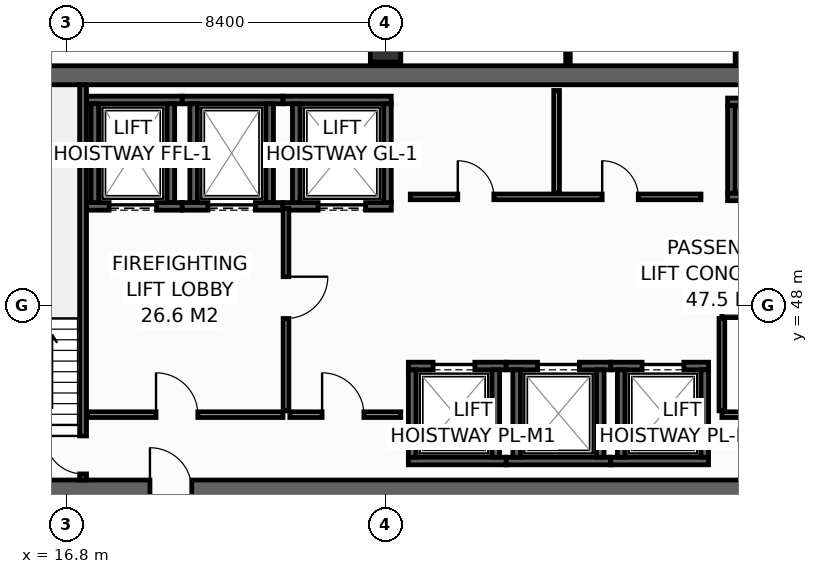
"""IFC4 building model, lengths in metres.
Left out: names, types, materials, properties, quantities, classifications, styles, units other than length and angle.
Written with IfcOpenShell. Run it as: python <this file> out.ifc"""

import sys

from ifc_helpers import new_model, si_unit, direction, frame, frame_2d, origin, origin_2d, place, context, subcontext, project, spatial, rectangle, hollow_rectangle, extrude, element, fill, save


model = new_model("IFC4")
c1 = context("Model", 3, precision=1e-05, world=origin(), true_north=direction((0.0, 1.0)))
c2 = subcontext(c1, "Body", "Model", "MODEL_VIEW")
j1 = project(units=[si_unit("LENGTHUNIT", "METRE"), si_unit("PLANEANGLEUNIT", "RADIAN")], contexts=[c1])
p1 = place(None, origin())
s1 = spatial("IfcSite", under=j1, at=p1, CompositionType="ELEMENT")
p2 = place(p1, origin())
s2 = spatial("IfcBuilding", under=s1, at=p2, CompositionType="ELEMENT")
p3 = place(p2, frame((0.0, 0.0, 209.4)))
s3 = spatial("IfcBuildingStorey", under=s2, at=p3, CompositionType="ELEMENT", Elevation=209.4)
p4 = place(p3, frame((13.6, 43.15, 0.0), z_axis=(0.0, 0.0, 1.0), x_axis=(1.0, 0.0, 0.0)))
e1 = element("IfcWall", 1, at=p4, inside=s3, PredefinedType="SHEAR", context=c2, shape_type="SweptSolid", body=[
    extrude(rectangle(XDim=32.7, YDim=0.5, at=frame_2d((16.35, 0.0))), origin(), (0.0, 0.0, 1.0), 3.55),
])
p5 = place(p4, frame((5.4, 0.0, 0.0)))
e2 = element("IfcOpeningElement", 2, at=p5, cuts=e1, PredefinedType="OPENING", context=c2, shape_type="SweptSolid", body=[
    extrude(rectangle(XDim=1.1, YDim=2.15, at=frame_2d((0.55, 1.075))), frame((0.0, 0.26, 0.0), z_axis=(0.0, -1.0, 0.0), x_axis=(1.0, 0.0, 0.0)), (0.0, 0.0, 1.0), 0.52),
])
p6 = place(p4, frame((25.6, 0.0, 0.0)))
e3 = element("IfcOpeningElement", 3, at=p6, cuts=e1, PredefinedType="OPENING", context=c2, shape_type="SweptSolid", body=[
    extrude(rectangle(XDim=1.1, YDim=2.15, at=frame_2d((0.55, 1.075))), frame((0.0, 0.26, 0.0), z_axis=(0.0, -1.0, 0.0), x_axis=(1.0, 0.0, 0.0)), (0.0, 0.0, 1.0), 0.52),
])
p7 = place(p3, frame((13.6, 54.05, 0.0), z_axis=(0.0, 0.0, 1.0), x_axis=(1.0, 0.0, 0.0)))
e4 = element("IfcWall", 4, at=p7, inside=s3, PredefinedType="SHEAR", context=c2, shape_type="SweptSolid", body=[
    extrude(rectangle(XDim=32.7, YDim=0.5, at=frame_2d((16.35, 0.0))), origin(), (0.0, 0.0, 1.0), 3.55),
])
for number, where, z_axis, x_axis in (
    (5, (25.2, 54.8, 0.0), (0.0, 0.0, 1.0), (1.0, 0.0, 0.0)),
    (6, (34.8, 54.8, 0.0), (0.0, 0.0, 1.0), (1.0, 0.0, 0.0)),
):
    element("IfcColumn", number, at=place(p3, frame(where, z_axis=z_axis, x_axis=x_axis)), inside=s3, PredefinedType="COLUMN", context=c2, shape_type="SweptSolid", body=[
        extrude(hollow_rectangle(XDim=0.8, YDim=0.8, WallThickness=0.036, at=origin_2d()), origin(), (0.0, 0.0, 1.0), 3.8),
    ])
p8 = place(p3, frame((17.33, 50.6, 0.0), z_axis=(0.0, 0.0, 1.0), x_axis=(1.0, 0.0, 0.0)))
e7 = element("IfcWall", 7, at=p8, inside=s3, PredefinedType="SHEAR", context=c2, shape_type="SweptSolid", body=[
    extrude(rectangle(XDim=2.52, YDim=0.2, at=frame_2d((1.26, 0.0))), origin(), (0.0, 0.0, 1.0), 3.55),
])
p9 = place(p8, frame((0.595, 0.0, 0.0)))
e8 = element("IfcOpeningElement", 8, at=p9, cuts=e7, PredefinedType="OPENING", context=c2, shape_type="SweptSolid", body=[
    extrude(rectangle(XDim=1.25, YDim=2.3, at=frame_2d((0.625, 1.15))), frame((0.0, 0.11, 0.0), z_axis=(0.0, -1.0, 0.0), x_axis=(1.0, 0.0, 0.0)), (0.0, 0.0, 1.0), 0.22),
])
p10 = place(p3, frame((17.33, 53.4, 0.0), z_axis=(0.0, 0.0, 1.0), x_axis=(1.0, 0.0, 0.0)))
e9 = element("IfcWall", 9, at=p10, inside=s3, PredefinedType="SHEAR", context=c2, shape_type="SweptSolid", body=[
    extrude(rectangle(XDim=2.52, YDim=0.2, at=frame_2d((1.26, 0.0))), origin(), (0.0, 0.0, 1.0), 3.55),
])
for number, where, z_axis, x_axis in (
    (10, (17.55, 50.7, 0.0), (0.0, 0.0, 1.0), (0.0, 1.0, 0.0)),
    (11, (19.55, 50.7, 0.0), (0.0, 0.0, 1.0), (0.0, 1.0, 0.0)),
):
    element("IfcWall", number, at=place(p3, frame(where, z_axis=z_axis, x_axis=x_axis)), inside=s3, PredefinedType="SHEAR", context=c2, shape_type="SweptSolid", body=[
        extrude(rectangle(XDim=2.6, YDim=0.2, at=frame_2d((1.3, 0.0))), origin(), (0.0, 0.0, 1.0), 3.55),
    ])
p11 = place(p3, frame((19.85, 50.6, 0.0), z_axis=(0.0, 0.0, 1.0), x_axis=(1.0, 0.0, 0.0)))
e12 = element("IfcWall", 12, at=p11, inside=s3, PredefinedType="SHEAR", context=c2, shape_type="SweptSolid", body=[
    extrude(rectangle(XDim=2.65, YDim=0.2, at=frame_2d((1.325, 0.0))), origin(), (0.0, 0.0, 1.0), 3.55),
])
p12 = place(p11, frame((0.675, 0.0, 0.0)))
e13 = element("IfcOpeningElement", 13, at=p12, cuts=e12, PredefinedType="OPENING", context=c2, shape_type="SweptSolid", body=[
    extrude(rectangle(XDim=1.25, YDim=2.3, at=frame_2d((0.625, 1.15))), frame((0.0, 0.11, 0.0), z_axis=(0.0, -1.0, 0.0), x_axis=(1.0, 0.0, 0.0)), (0.0, 0.0, 1.0), 0.22),
])
p13 = place(p3, frame((19.85, 53.4, 0.0), z_axis=(0.0, 0.0, 1.0), x_axis=(1.0, 0.0, 0.0)))
e14 = element("IfcWall", 14, at=p13, inside=s3, PredefinedType="SHEAR", context=c2, shape_type="SweptSolid", body=[
    extrude(rectangle(XDim=2.65, YDim=0.2, at=frame_2d((1.325, 0.0))), origin(), (0.0, 0.0, 1.0), 3.55),
])
for number, where, z_axis, x_axis in (
    (15, (20.15, 50.7, 0.0), (0.0, 0.0, 1.0), (0.0, 1.0, 0.0)),
    (16, (22.15, 50.7, 0.0), (0.0, 0.0, 1.0), (0.0, 1.0, 0.0)),
):
    element("IfcWall", number, at=place(p3, frame(where, z_axis=z_axis, x_axis=x_axis)), inside=s3, PredefinedType="SHEAR", context=c2, shape_type="SweptSolid", body=[
        extrude(rectangle(XDim=2.6, YDim=0.2, at=frame_2d((1.3, 0.0))), origin(), (0.0, 0.0, 1.0), 3.55),
    ])
p14 = place(p3, frame((22.5, 50.6, 0.0), z_axis=(0.0, 0.0, 1.0), x_axis=(1.0, 0.0, 0.0)))
e17 = element("IfcWall", 17, at=p14, inside=s3, PredefinedType="SHEAR", context=c2, shape_type="SweptSolid", body=[
    extrude(rectangle(XDim=2.85, YDim=0.2, at=frame_2d((1.425, 0.0))), origin(), (0.0, 0.0, 1.0), 3.55),
])
p15 = place(p14, frame((0.925, 0.0, 0.0)))
e18 = element("IfcOpeningElement", 18, at=p15, cuts=e17, PredefinedType="OPENING", context=c2, shape_type="SweptSolid", body=[
    extrude(rectangle(XDim=1.25, YDim=2.3, at=frame_2d((0.625, 1.15))), frame((0.0, 0.11, 0.0), z_axis=(0.0, -1.0, 0.0), x_axis=(1.0, 0.0, 0.0)), (0.0, 0.0, 1.0), 0.22),
])
p16 = place(p3, frame((22.5, 53.4, 0.0), z_axis=(0.0, 0.0, 1.0), x_axis=(1.0, 0.0, 0.0)))
e19 = element("IfcWall", 19, at=p16, inside=s3, PredefinedType="SHEAR", context=c2, shape_type="SweptSolid", body=[
    extrude(rectangle(XDim=2.85, YDim=0.2, at=frame_2d((1.425, 0.0))), origin(), (0.0, 0.0, 1.0), 3.55),
])
for number, where, z_axis, x_axis in (
    (20, (22.85, 50.7, 0.0), (0.0, 0.0, 1.0), (0.0, 1.0, 0.0)),
    (21, (25.25, 50.7, 0.0), (0.0, 0.0, 1.0), (0.0, 1.0, 0.0)),
):
    element("IfcWall", number, at=place(p3, frame(where, z_axis=z_axis, x_axis=x_axis)), inside=s3, PredefinedType="SHEAR", context=c2, shape_type="SweptSolid", body=[
        extrude(rectangle(XDim=2.6, YDim=0.2, at=frame_2d((1.3, 0.0))), origin(), (0.0, 0.0, 1.0), 3.55),
    ])
p17 = place(p3, frame((25.8, 43.9, 0.0), z_axis=(0.0, 0.0, 1.0), x_axis=(1.0, 0.0, 0.0)))
e22 = element("IfcWall", 22, at=p17, inside=s3, PredefinedType="SHEAR", context=c2, shape_type="SweptSolid", body=[
    extrude(rectangle(XDim=2.575, YDim=0.2, at=frame_2d((1.288, 0.0))), origin(), (0.0, 0.0, 1.0), 3.55),
])
p18 = place(p3, frame((25.8, 46.4, 0.0), z_axis=(0.0, 0.0, 1.0), x_axis=(1.0, 0.0, 0.0)))
e23 = element("IfcWall", 23, at=p18, inside=s3, PredefinedType="SHEAR", context=c2, shape_type="SweptSolid", body=[
    extrude(rectangle(XDim=2.575, YDim=0.2, at=frame_2d((1.288, 0.0))), origin(), (0.0, 0.0, 1.0), 3.55),
])
p19 = place(p18, frame((0.65, 0.0, 0.0)))
e24 = element("IfcOpeningElement", 24, at=p19, cuts=e23, PredefinedType="OPENING", context=c2, shape_type="SweptSolid", body=[
    extrude(rectangle(XDim=1.1, YDim=2.2, at=frame_2d((0.55, 1.1))), frame((0.0, 0.11, 0.0), z_axis=(0.0, -1.0, 0.0), x_axis=(1.0, 0.0, 0.0)), (0.0, 0.0, 1.0), 0.22),
])
for number, where, z_axis, x_axis in (
    (25, (25.9, 44.0, 0.0), (0.0, 0.0, 1.0), (0.0, 1.0, 0.0)),
    (26, (28.1, 44.0, 0.0), (0.0, 0.0, 1.0), (0.0, 1.0, 0.0)),
):
    element("IfcWall", number, at=place(p3, frame(where, z_axis=z_axis, x_axis=x_axis)), inside=s3, PredefinedType="SHEAR", context=c2, shape_type="SweptSolid", body=[
        extrude(rectangle(XDim=2.3, YDim=0.2, at=frame_2d((1.15, 0.0))), origin(), (0.0, 0.0, 1.0), 3.55),
    ])
p20 = place(p3, frame((28.375, 43.9, 0.0), z_axis=(0.0, 0.0, 1.0), x_axis=(1.0, 0.0, 0.0)))
e27 = element("IfcWall", 27, at=p20, inside=s3, PredefinedType="SHEAR", context=c2, shape_type="SweptSolid", body=[
    extrude(rectangle(XDim=2.75, YDim=0.2, at=frame_2d((1.375, 0.0))), origin(), (0.0, 0.0, 1.0), 3.55),
])
p21 = place(p3, frame((28.375, 46.4, 0.0), z_axis=(0.0, 0.0, 1.0), x_axis=(1.0, 0.0, 0.0)))
e28 = element("IfcWall", 28, at=p21, inside=s3, PredefinedType="SHEAR", context=c2, shape_type="SweptSolid", body=[
    extrude(rectangle(XDim=2.75, YDim=0.2, at=frame_2d((1.375, 0.0))), origin(), (0.0, 0.0, 1.0), 3.55),
])
p22 = place(p21, frame((0.825, 0.0, 0.0)))
e29 = element("IfcOpeningElement", 29, at=p22, cuts=e28, PredefinedType="OPENING", context=c2, shape_type="SweptSolid", body=[
    extrude(rectangle(XDim=1.1, YDim=2.2, at=frame_2d((0.55, 1.1))), frame((0.0, 0.11, 0.0), z_axis=(0.0, -1.0, 0.0), x_axis=(1.0, 0.0, 0.0)), (0.0, 0.0, 1.0), 0.22),
])
for number, where, z_axis, x_axis in (
    (30, (28.65, 44.0, 0.0), (0.0, 0.0, 1.0), (0.0, 1.0, 0.0)),
    (31, (30.85, 44.0, 0.0), (0.0, 0.0, 1.0), (0.0, 1.0, 0.0)),
):
    element("IfcWall", number, at=place(p3, frame(where, z_axis=z_axis, x_axis=x_axis)), inside=s3, PredefinedType="SHEAR", context=c2, shape_type="SweptSolid", body=[
        extrude(rectangle(XDim=2.3, YDim=0.2, at=frame_2d((1.15, 0.0))), origin(), (0.0, 0.0, 1.0), 3.55),
    ])
p23 = place(p3, frame((31.125, 43.9, 0.0), z_axis=(0.0, 0.0, 1.0), x_axis=(1.0, 0.0, 0.0)))
e32 = element("IfcWall", 32, at=p23, inside=s3, PredefinedType="SHEAR", context=c2, shape_type="SweptSolid", body=[
    extrude(rectangle(XDim=2.575, YDim=0.2, at=frame_2d((1.288, 0.0))), origin(), (0.0, 0.0, 1.0), 3.55),
])
p24 = place(p3, frame((31.125, 46.4, 0.0), z_axis=(0.0, 0.0, 1.0), x_axis=(1.0, 0.0, 0.0)))
e33 = element("IfcWall", 33, at=p24, inside=s3, PredefinedType="SHEAR", context=c2, shape_type="SweptSolid", body=[
    extrude(rectangle(XDim=2.575, YDim=0.2, at=frame_2d((1.288, 0.0))), origin(), (0.0, 0.0, 1.0), 3.55),
])
p25 = place(p24, frame((0.825, 0.0, 0.0)))
e34 = element("IfcOpeningElement", 34, at=p25, cuts=e33, PredefinedType="OPENING", context=c2, shape_type="SweptSolid", body=[
    extrude(rectangle(XDim=1.1, YDim=2.2, at=frame_2d((0.55, 1.1))), frame((0.0, 0.11, 0.0), z_axis=(0.0, -1.0, 0.0), x_axis=(1.0, 0.0, 0.0)), (0.0, 0.0, 1.0), 0.22),
])
for number, where, z_axis, x_axis in (
    (35, (31.4, 44.0, 0.0), (0.0, 0.0, 1.0), (0.0, 1.0, 0.0)),
    (36, (33.6, 44.0, 0.0), (0.0, 0.0, 1.0), (0.0, 1.0, 0.0)),
):
    element("IfcWall", number, at=place(p3, frame(where, z_axis=z_axis, x_axis=x_axis)), inside=s3, PredefinedType="SHEAR", context=c2, shape_type="SweptSolid", body=[
        extrude(rectangle(XDim=2.3, YDim=0.2, at=frame_2d((1.15, 0.0))), origin(), (0.0, 0.0, 1.0), 3.55),
    ])
for number, where, z_axis, x_axis in (
    (37, (34.2, 50.85, 0.0), (0.0, 0.0, 1.0), (1.0, 0.0, 0.0)),
    (38, (34.2, 53.35, 0.0), (0.0, 0.0, 1.0), (1.0, 0.0, 0.0)),
):
    element("IfcWall", number, at=place(p3, frame(where, z_axis=z_axis, x_axis=x_axis)), inside=s3, PredefinedType="SHEAR", context=c2, shape_type="SweptSolid", body=[
        extrude(rectangle(XDim=2.575, YDim=0.2, at=frame_2d((1.288, 0.0))), origin(), (0.0, 0.0, 1.0), 3.55),
    ])
p26 = place(p3, frame((34.3, 50.95, 0.0), z_axis=(0.0, 0.0, 1.0), x_axis=(0.0, 1.0, 0.0)))
e39 = element("IfcWall", 39, at=p26, inside=s3, PredefinedType="SHEAR", context=c2, shape_type="SweptSolid", body=[
    extrude(rectangle(XDim=2.3, YDim=0.2, at=frame_2d((1.15, 0.0))), origin(), (0.0, 0.0, 1.0), 3.55),
])
p27 = place(p3, frame((17.24, 43.4, 0.0), z_axis=(0.0, 0.0, 1.0), x_axis=(0.0, 1.0, 0.0)))
e40 = element("IfcWall", 40, at=p27, inside=s3, PredefinedType="SHEAR", context=c2, shape_type="SweptSolid", body=[
    extrude(rectangle(XDim=10.4, YDim=0.18, at=frame_2d((5.2, 0.0))), origin(), (0.0, 0.0, 1.0), 3.55),
])
p28 = place(p27, frame((0.16, 0.0, 0.0)))
e41 = element("IfcOpeningElement", 41, at=p28, cuts=e40, PredefinedType="OPENING", context=c2, shape_type="SweptSolid", body=[
    extrude(rectangle(XDim=1.0, YDim=2.15, at=frame_2d((0.5, 1.075))), frame((0.0, 0.1, 0.0), z_axis=(0.0, -1.0, 0.0), x_axis=(1.0, 0.0, 0.0)), (0.0, 0.0, 1.0), 0.2),
])
p29 = place(p3, frame((17.36, 45.12, 0.0), z_axis=(0.0, 0.0, 1.0), x_axis=(1.0, 0.0, 0.0)))
e42 = element("IfcWall", 42, at=p29, inside=s3, PredefinedType="PARTITIONING", context=c2, shape_type="SweptSolid", body=[
    extrude(rectangle(XDim=5.14, YDim=0.15, at=frame_2d((2.57, 0.0))), origin(), (0.0, 0.0, 1.0), 3.55),
])
p30 = place(p29, frame((1.8, 0.0, 0.0)))
e43 = element("IfcOpeningElement", 43, at=p30, cuts=e42, PredefinedType="OPENING", context=c2, shape_type="SweptSolid", body=[
    extrude(rectangle(XDim=1.1, YDim=2.15, at=frame_2d((0.55, 1.075))), frame((0.0, 0.085, 0.0), z_axis=(0.0, -1.0, 0.0), x_axis=(1.0, 0.0, 0.0)), (0.0, 0.0, 1.0), 0.17),
])
p31 = place(p3, frame((22.58, 50.55, 0.0), z_axis=(0.0, 0.0, 1.0), x_axis=(0.0, -1.0, 0.0)))
e44 = element("IfcWall", 44, at=p31, inside=s3, PredefinedType="PARTITIONING", context=c2, shape_type="SweptSolid", body=[
    extrude(rectangle(XDim=5.33, YDim=0.15, at=frame_2d((2.665, 0.0))), origin(), (0.0, 0.0, 1.0), 3.55),
])
p32 = place(p31, frame((1.8, 0.0, 0.0)))
e45 = element("IfcOpeningElement", 45, at=p32, cuts=e44, PredefinedType="OPENING", context=c2, shape_type="SweptSolid", body=[
    extrude(rectangle(XDim=1.1, YDim=2.15, at=frame_2d((0.55, 1.075))), frame((0.0, 0.085, 0.0), z_axis=(0.0, -1.0, 0.0), x_axis=(1.0, 0.0, 0.0)), (0.0, 0.0, 1.0), 0.17),
])
p33 = place(p3, frame((22.68, 45.12, 0.0), z_axis=(0.0, 0.0, 1.0), x_axis=(1.0, 0.0, 0.0)))
e46 = element("IfcWall", 46, at=p33, inside=s3, PredefinedType="PARTITIONING", context=c2, shape_type="SweptSolid", body=[
    extrude(rectangle(XDim=2.92, YDim=0.15, at=frame_2d((1.46, 0.0))), origin(), (0.0, 0.0, 1.0), 3.55),
])
p34 = place(p33, frame((0.85, 0.0, 0.0)))
e47 = element("IfcOpeningElement", 47, at=p34, cuts=e46, PredefinedType="OPENING", context=c2, shape_type="SweptSolid", body=[
    extrude(rectangle(XDim=1.1, YDim=2.15, at=frame_2d((0.55, 1.075))), frame((0.0, 0.085, 0.0), z_axis=(0.0, -1.0, 0.0), x_axis=(1.0, 0.0, 0.0)), (0.0, 0.0, 1.0), 0.17),
])
p35 = place(p3, frame((34.05, 45.12, 0.0), z_axis=(0.0, 0.0, 1.0), x_axis=(1.0, 0.0, 0.0)))
e48 = element("IfcWall", 48, at=p35, inside=s3, PredefinedType="PARTITIONING", context=c2, shape_type="SweptSolid", body=[
    extrude(rectangle(XDim=8.45, YDim=0.15, at=frame_2d((4.225, 0.0))), origin(), (0.0, 0.0, 1.0), 3.55),
])
p36 = place(p35, frame((3.6, 0.0, 0.0)))
e49 = element("IfcOpeningElement", 49, at=p36, cuts=e48, PredefinedType="OPENING", context=c2, shape_type="SweptSolid", body=[
    extrude(rectangle(XDim=0.95, YDim=2.15, at=frame_2d((0.475, 1.075))), frame((0.0, 0.085, 0.0), z_axis=(0.0, -1.0, 0.0), x_axis=(1.0, 0.0, 0.0)), (0.0, 0.0, 1.0), 0.17),
])
p37 = place(p3, frame((34.05, 47.75, 0.0), z_axis=(0.0, 0.0, 1.0), x_axis=(1.0, 0.0, 0.0)))
e50 = element("IfcWall", 50, at=p37, inside=s3, PredefinedType="PARTITIONING", context=c2, shape_type="SweptSolid", body=[
    extrude(rectangle(XDim=8.45, YDim=0.15, at=frame_2d((4.225, 0.0))), origin(), (0.0, 0.0, 1.0), 3.55),
])
p38 = place(p3, frame((34.05, 45.22, 0.0), z_axis=(0.0, 0.0, 1.0), x_axis=(0.0, 1.0, 0.0)))
e51 = element("IfcWall", 51, at=p38, inside=s3, PredefinedType="PARTITIONING", context=c2, shape_type="SweptSolid", body=[
    extrude(rectangle(XDim=2.43, YDim=0.15, at=frame_2d((1.215, 0.0))), origin(), (0.0, 0.0, 1.0), 3.55),
])
p39 = place(p3, frame((25.85, 50.85, 0.0), z_axis=(0.0, 0.0, 1.0), x_axis=(1.0, 0.0, 0.0)))
e52 = element("IfcWall", 52, at=p39, inside=s3, PredefinedType="PARTITIONING", context=c2, shape_type="SweptSolid", body=[
    extrude(rectangle(XDim=7.65, YDim=0.15, at=frame_2d((3.825, 0.0))), origin(), (0.0, 0.0, 1.0), 3.55),
])
p40 = place(p39, frame((1.25, 0.0, 0.0)))
e53 = element("IfcOpeningElement", 53, at=p40, cuts=e52, PredefinedType="OPENING", context=c2, shape_type="SweptSolid", body=[
    extrude(rectangle(XDim=0.95, YDim=2.15, at=frame_2d((0.475, 1.075))), frame((0.0, 0.085, 0.0), z_axis=(0.0, -1.0, 0.0), x_axis=(1.0, 0.0, 0.0)), (0.0, 0.0, 1.0), 0.17),
])
p41 = place(p39, frame((5.05, 0.0, 0.0)))
e54 = element("IfcOpeningElement", 54, at=p41, cuts=e52, PredefinedType="OPENING", context=c2, shape_type="SweptSolid", body=[
    extrude(rectangle(XDim=0.95, YDim=2.15, at=frame_2d((0.475, 1.075))), frame((0.0, 0.085, 0.0), z_axis=(0.0, -1.0, 0.0), x_axis=(1.0, 0.0, 0.0)), (0.0, 0.0, 1.0), 0.17),
])
p42 = place(p3, frame((29.7, 50.95, 0.0), z_axis=(0.0, 0.0, 1.0), x_axis=(0.0, 1.0, 0.0)))
e55 = element("IfcWall", 55, at=p42, inside=s3, PredefinedType="PARTITIONING", context=c2, shape_type="SweptSolid", body=[
    extrude(rectangle(XDim=2.7, YDim=0.15, at=frame_2d((1.35, 0.0))), origin(), (0.0, 0.0, 1.0), 3.55),
])
p43 = place(p3, frame((30.0, 54.32, 0.0), z_axis=(0.0, 0.0, 1.0), x_axis=(0.0, 1.0, 0.0)))
e56 = element("IfcWall", 56, at=p43, inside=s3, PredefinedType="PARTITIONING", context=c2, shape_type="SweptSolid", body=[
    extrude(rectangle(XDim=1.675, YDim=0.12, at=frame_2d((0.837, 0.0))), origin(), (0.0, 0.0, 1.0), 2.935),
])
p44 = place(p9, origin())
e57 = element("IfcDoor", 57, at=p44, inside=s3, OperationType="SLIDING_TO_LEFT", PredefinedType="DOOR", context=c2, shape_type="SweptSolid", body=[
    extrude(rectangle(XDim=1.25, YDim=2.3, at=frame_2d((0.625, 1.15))), frame((0.0, 0.025, 0.0), z_axis=(0.0, -1.0, 0.0), x_axis=(1.0, 0.0, 0.0)), (0.0, 0.0, 1.0), 0.05),
])
fill(e8, e57)
p45 = place(p12, origin())
e58 = element("IfcDoor", 58, at=p45, inside=s3, OperationType="SLIDING_TO_LEFT", PredefinedType="DOOR", context=c2, shape_type="SweptSolid", body=[
    extrude(rectangle(XDim=1.25, YDim=2.3, at=frame_2d((0.625, 1.15))), frame((0.0, 0.025, 0.0), z_axis=(0.0, -1.0, 0.0), x_axis=(1.0, 0.0, 0.0)), (0.0, 0.0, 1.0), 0.05),
])
fill(e13, e58)
p46 = place(p15, origin())
e59 = element("IfcDoor", 59, at=p46, inside=s3, OperationType="SLIDING_TO_LEFT", PredefinedType="DOOR", context=c2, shape_type="SweptSolid", body=[
    extrude(rectangle(XDim=1.25, YDim=2.3, at=frame_2d((0.625, 1.15))), frame((0.0, 0.025, 0.0), z_axis=(0.0, -1.0, 0.0), x_axis=(1.0, 0.0, 0.0)), (0.0, 0.0, 1.0), 0.05),
])
fill(e18, e59)
p47 = place(p19, origin())
e60 = element("IfcDoor", 60, at=p47, inside=s3, OperationType="SLIDING_TO_LEFT", PredefinedType="DOOR", context=c2, shape_type="SweptSolid", body=[
    extrude(rectangle(XDim=1.1, YDim=2.2, at=frame_2d((0.55, 1.1))), frame((0.0, 0.025, 0.0), z_axis=(0.0, -1.0, 0.0), x_axis=(1.0, 0.0, 0.0)), (0.0, 0.0, 1.0), 0.05),
])
fill(e24, e60)
p48 = place(p22, origin())
e61 = element("IfcDoor", 61, at=p48, inside=s3, OperationType="SLIDING_TO_LEFT", PredefinedType="DOOR", context=c2, shape_type="SweptSolid", body=[
    extrude(rectangle(XDim=1.1, YDim=2.2, at=frame_2d((0.55, 1.1))), frame((0.0, 0.025, 0.0), z_axis=(0.0, -1.0, 0.0), x_axis=(1.0, 0.0, 0.0)), (0.0, 0.0, 1.0), 0.05),
])
fill(e29, e61)
p49 = place(p25, origin())
e62 = element("IfcDoor", 62, at=p49, inside=s3, OperationType="SLIDING_TO_LEFT", PredefinedType="DOOR", context=c2, shape_type="SweptSolid", body=[
    extrude(rectangle(XDim=1.1, YDim=2.2, at=frame_2d((0.55, 1.1))), frame((0.0, 0.025, 0.0), z_axis=(0.0, -1.0, 0.0), x_axis=(1.0, 0.0, 0.0)), (0.0, 0.0, 1.0), 0.05),
])
fill(e34, e62)
p50 = place(p28, origin())
e63 = element("IfcDoor", 63, at=p50, inside=s3, OperationType="SINGLE_SWING_RIGHT", PredefinedType="DOOR", context=c2, shape_type="SweptSolid", body=[
    extrude(rectangle(XDim=1.0, YDim=2.15, at=frame_2d((0.5, 1.075))), frame((0.0, 0.025, 0.0), z_axis=(0.0, -1.0, 0.0), x_axis=(1.0, 0.0, 0.0)), (0.0, 0.0, 1.0), 0.05),
])
fill(e41, e63)
p51 = place(p30, origin())
e64 = element("IfcDoor", 64, at=p51, inside=s3, OperationType="SINGLE_SWING_LEFT", PredefinedType="DOOR", context=c2, shape_type="SweptSolid", body=[
    extrude(rectangle(XDim=1.1, YDim=2.15, at=frame_2d((0.55, 1.075))), frame((0.0, 0.025, 0.0), z_axis=(0.0, -1.0, 0.0), x_axis=(1.0, 0.0, 0.0)), (0.0, 0.0, 1.0), 0.05),
])
fill(e43, e64)
p52 = place(p32, origin())
e65 = element("IfcDoor", 65, at=p52, inside=s3, OperationType="SINGLE_SWING_LEFT", PredefinedType="DOOR", context=c2, shape_type="SweptSolid", body=[
    extrude(rectangle(XDim=1.1, YDim=2.15, at=frame_2d((0.55, 1.075))), frame((0.0, 0.025, 0.0), z_axis=(0.0, -1.0, 0.0), x_axis=(1.0, 0.0, 0.0)), (0.0, 0.0, 1.0), 0.05),
])
fill(e45, e65)
p53 = place(p34, origin())
e66 = element("IfcDoor", 66, at=p53, inside=s3, OperationType="SINGLE_SWING_LEFT", PredefinedType="DOOR", context=c2, shape_type="SweptSolid", body=[
    extrude(rectangle(XDim=1.1, YDim=2.15, at=frame_2d((0.55, 1.075))), frame((0.0, 0.025, 0.0), z_axis=(0.0, -1.0, 0.0), x_axis=(1.0, 0.0, 0.0)), (0.0, 0.0, 1.0), 0.05),
])
fill(e47, e66)
p54 = place(p5, origin())
e67 = element("IfcDoor", 67, at=p54, inside=s3, OperationType="SINGLE_SWING_LEFT", PredefinedType="DOOR", context=c2, shape_type="SweptSolid", body=[
    extrude(rectangle(XDim=1.1, YDim=2.15, at=frame_2d((0.55, 1.075))), frame((0.0, 0.025, 0.0), z_axis=(0.0, -1.0, 0.0), x_axis=(1.0, 0.0, 0.0)), (0.0, 0.0, 1.0), 0.05),
])
fill(e2, e67)
p55 = place(p40, origin())
e68 = element("IfcDoor", 68, at=p55, inside=s3, OperationType="SINGLE_SWING_LEFT", PredefinedType="DOOR", context=c2, shape_type="SweptSolid", body=[
    extrude(rectangle(XDim=0.95, YDim=2.15, at=frame_2d((0.475, 1.075))), frame((0.0, 0.025, 0.0), z_axis=(0.0, -1.0, 0.0), x_axis=(1.0, 0.0, 0.0)), (0.0, 0.0, 1.0), 0.05),
])
fill(e53, e68)
p56 = place(p41, origin())
e69 = element("IfcDoor", 69, at=p56, inside=s3, OperationType="SINGLE_SWING_LEFT", PredefinedType="DOOR", context=c2, shape_type="SweptSolid", body=[
    extrude(rectangle(XDim=0.95, YDim=2.15, at=frame_2d((0.475, 1.075))), frame((0.0, 0.025, 0.0), z_axis=(0.0, -1.0, 0.0), x_axis=(1.0, 0.0, 0.0)), (0.0, 0.0, 1.0), 0.05),
])
fill(e54, e69)
save(model, sys.argv[1])
